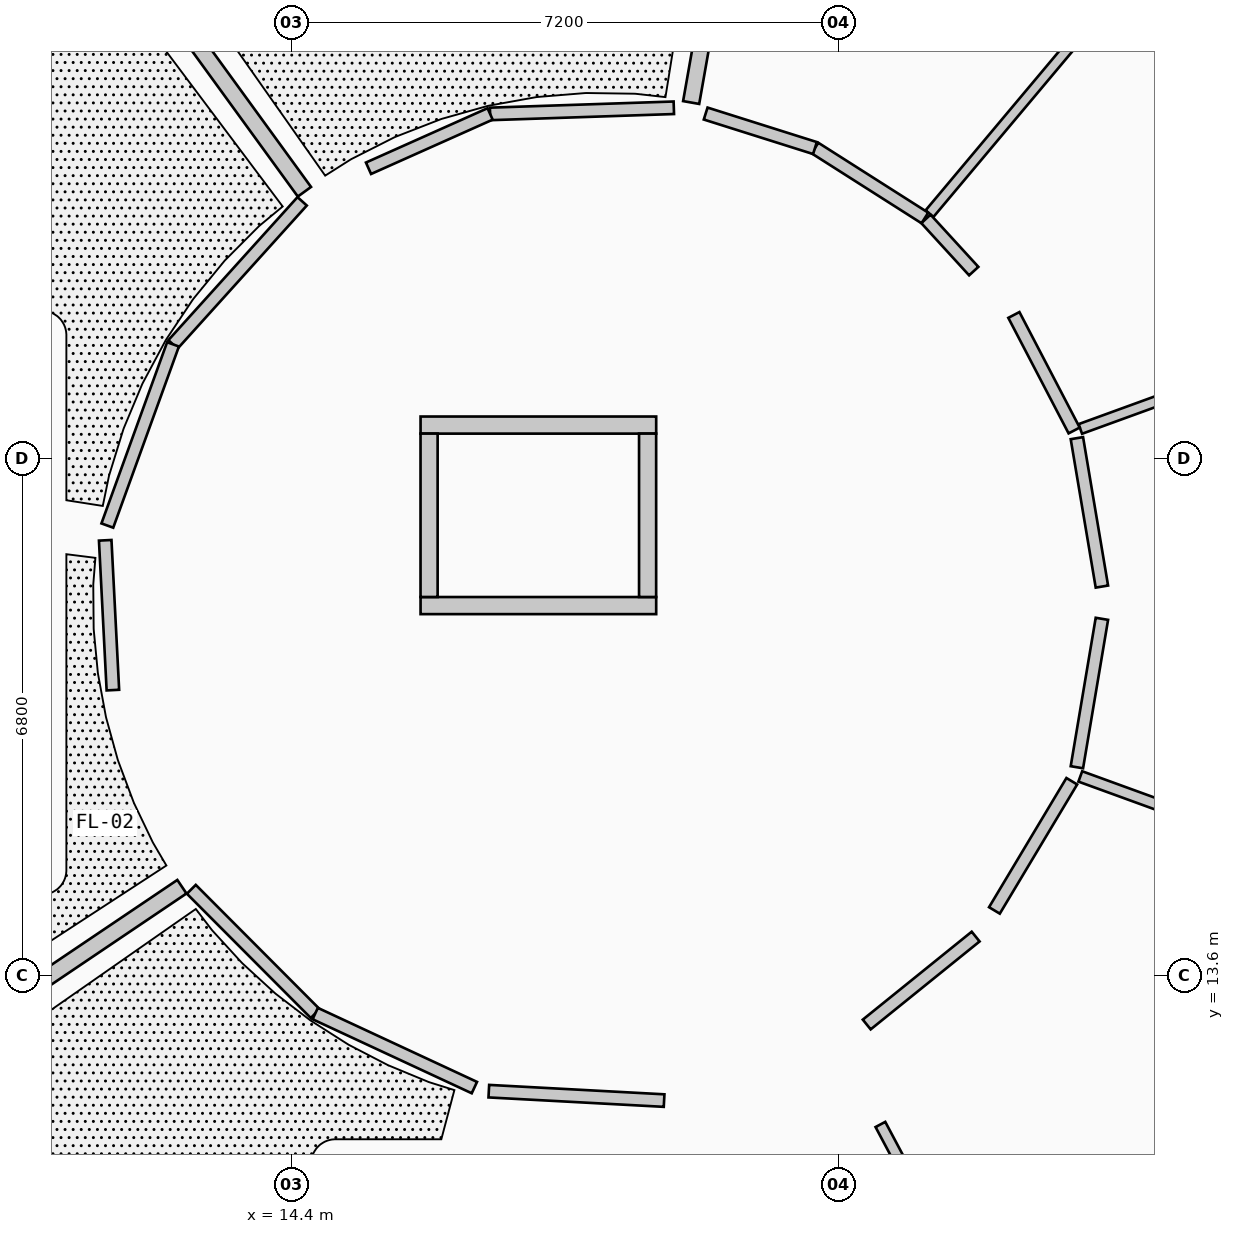
"""IFC4 building model, lengths in metres.
Left out: names, types, materials, properties, quantities, classifications, styles, units other than length and angle.
Written with IfcOpenShell. Run it as: python <this file> out.ifc"""

import sys

from ifc_helpers import new_model, si_unit, direction, frame, frame_2d, origin, origin_2d, place, context, subcontext, project, spatial, rectangle, extrude, element, fill, save


model = new_model("IFC4")
c1 = context("Model", 3, precision=1e-05, world=origin(), true_north=direction((0.0, 1.0)))
c2 = subcontext(c1, "Body", "Model", "MODEL_VIEW")
j1 = project(units=[si_unit("LENGTHUNIT", "METRE"), si_unit("PLANEANGLEUNIT", "RADIAN")], contexts=[c1])
p1 = place(None, origin())
s1 = spatial("IfcSite", under=j1, at=p1, CompositionType="ELEMENT")
p2 = place(p1, origin())
s2 = spatial("IfcBuilding", under=s1, at=p2, CompositionType="ELEMENT")
p3 = place(p2, frame((0.0, 0.0, 4.55)))
s3 = spatial("IfcBuildingStorey", under=s2, at=p3, CompositionType="ELEMENT", Elevation=4.55)
for number, where, z_axis, x_axis in (
    (1, (25.1, 18.5, 0.0), (0.0, 0.0, 1.0), (1.0, 0.0, 0.0)),
    (2, (23.556, 22.742, 0.0), (0.0, 0.0, 1.0), (1.0, 0.0, 0.0)),
    (3, (19.646, 25.0, 0.0), (0.0, 0.0, 1.0), (1.0, 0.0, 0.0)),
    (4, (15.2, 24.216, 0.0), (0.0, 0.0, 1.0), (1.0, 0.0, 0.0)),
    (5, (23.556, 14.258, 0.0), (0.0, 0.0, 1.0), (1.0, 0.0, 0.0)),
):
    element("IfcColumn", number, at=place(p3, frame(where, z_axis=z_axis, x_axis=x_axis)), inside=s3, PredefinedType="COLUMN", context=c2, shape_type="SweptSolid", body=[
        extrude(rectangle(XDim=0.42, YDim=0.42, at=origin_2d()), origin(), (0.0, 0.0, 1.0), 4.2),
    ])
p4 = place(p3, frame((16.1, 18.462, 0.0), z_axis=(0.0, 0.0, 1.0), x_axis=(1.0, 0.0, 0.0)))
e6 = element("IfcWall", 6, at=p4, inside=s3, PredefinedType="SHEAR", context=c2, shape_type="SweptSolid", body=[
    extrude(rectangle(XDim=3.1, YDim=0.225, at=frame_2d((1.55, 0.0))), origin(), (0.0, 0.0, 1.0), 3.955),
])
p5 = place(p4, frame((0.9, 0.0, 0.0)))
e7 = element("IfcOpeningElement", 7, at=p5, cuts=e6, PredefinedType="OPENING", context=c2, shape_type="SweptSolid", body=[
    extrude(rectangle(XDim=1.3, YDim=2.2, at=frame_2d((0.65, 1.1))), frame((0.0, 0.123, 0.0), z_axis=(0.0, -1.0, 0.0), x_axis=(1.0, 0.0, 0.0)), (0.0, 0.0, 1.0), 0.245),
])
p6 = place(p3, frame((16.1, 20.837, 0.0), z_axis=(0.0, 0.0, 1.0), x_axis=(1.0, 0.0, 0.0)))
e8 = element("IfcWall", 8, at=p6, inside=s3, PredefinedType="SHEAR", context=c2, shape_type="SweptSolid", body=[
    extrude(rectangle(XDim=3.1, YDim=0.225, at=frame_2d((1.55, 0.0))), origin(), (0.0, 0.0, 1.0), 3.955),
])
for number, where, z_axis, x_axis in (
    (9, (16.212, 18.575, 0.0), (0.0, 0.0, 1.0), (0.0, 1.0, 0.0)),
    (10, (19.087, 18.575, 0.0), (0.0, 0.0, 1.0), (0.0, 1.0, 0.0)),
):
    element("IfcWall", number, at=place(p3, frame(where, z_axis=z_axis, x_axis=x_axis)), inside=s3, PredefinedType="SHEAR", context=c2, shape_type="SweptSolid", body=[
        extrude(rectangle(XDim=2.15, YDim=0.225, at=frame_2d((1.075, 0.0))), origin(), (0.0, 0.0, 1.0), 3.955),
    ])
p7 = place(p3, frame((19.66, 25.081, 0.0), z_axis=(0.0, 0.0, 1.0), x_axis=(0.173787813666, 0.984783121211, 0.0)))
e11 = element("IfcWall", 11, at=p7, inside=s3, PredefinedType="SOLIDWALL", context=c2, shape_type="SweptSolid", body=[
    extrude(rectangle(XDim=5.616, YDim=0.215, at=frame_2d((2.808, 0.0))), origin(), (0.0, 0.0, 1.0), 3.284),
])
p8 = place(p3, frame((14.572, 23.907, 0.0), z_axis=(0.0, 0.0, 1.0), x_axis=(-0.58782249157, 0.808989937146, 0.0)))
e12 = element("IfcWall", 12, at=p8, inside=s3, PredefinedType="SOLIDWALL", context=c2, shape_type="SweptSolid", body=[
    extrude(rectangle(XDim=5.571, YDim=0.215, at=frame_2d((2.786, 0.0))), origin(), (0.0, 0.0, 1.0), 3.284),
])
p9 = place(p3, frame((12.96, 14.763, 0.0), z_axis=(0.0, 0.0, 1.0), x_axis=(-0.829078742877, -0.559131861111, 0.0)))
e13 = element("IfcWall", 13, at=p9, inside=s3, PredefinedType="SOLIDWALL", context=c2, shape_type="SweptSolid", body=[
    extrude(rectangle(XDim=5.571, YDim=0.215, at=frame_2d((2.786, 0.0))), origin(), (0.0, 0.0, 1.0), 3.284),
])
p10 = place(p3, frame((22.15, 11.635, 0.0), z_axis=(0.0, 0.0, 1.0), x_axis=(0.469519274504, -0.882922222435, 0.0)))
e14 = element("IfcWall", 14, at=p10, inside=s3, PredefinedType="PARTITIONING", context=c2, shape_type="SweptSolid", body=[
    extrude(rectangle(XDim=4.494, YDim=0.145, at=frame_2d((2.247, 0.0))), origin(), (0.0, 0.0, 1.0), 3.284),
])
p11 = place(p3, frame((24.78, 16.214, 0.0), z_axis=(0.0, 0.0, 1.0), x_axis=(0.939718505705, -0.341949016719, 0.0)))
e15 = element("IfcWall", 15, at=p11, inside=s3, PredefinedType="PARTITIONING", context=c2, shape_type="SweptSolid", body=[
    extrude(rectangle(XDim=5.615, YDim=0.145, at=frame_2d((2.808, 0.0))), origin(), (0.0, 0.0, 1.0), 3.284),
])
p12 = place(p3, frame((24.78, 20.786, 0.0), z_axis=(0.0, 0.0, 1.0), x_axis=(0.939718505705, 0.341949016719, 0.0)))
e16 = element("IfcWall", 16, at=p12, inside=s3, PredefinedType="PLUMBINGWALL", context=c2, shape_type="SweptSolid", body=[
    extrude(rectangle(XDim=5.615, YDim=0.135, at=frame_2d((2.808, 0.0))), origin(), (0.0, 0.0, 1.0), 3.284),
])
p13 = place(p3, frame((22.796, 23.619, 0.0), z_axis=(0.0, 0.0, 1.0), x_axis=(0.642818869514, 0.766018211923, 0.0)))
e17 = element("IfcWall", 17, at=p13, inside=s3, PredefinedType="PLUMBINGWALL", context=c2, shape_type="SweptSolid", body=[
    extrude(rectangle(XDim=5.616, YDim=0.135, at=frame_2d((2.808, 0.0))), origin(), (0.0, 0.0, 1.0), 3.284),
])
p14 = place(p3, frame((19.432, 25.012, 0.0), z_axis=(0.0, 0.0, 1.0), x_axis=(-0.999438163876, -0.033516512162, 0.0)))
e18 = element("IfcWall", 18, at=p14, inside=s3, PredefinedType="PARTITIONING", context=c2, shape_type="SweptSolid", body=[
    extrude(rectangle(XDim=2.418, YDim=0.165, at=frame_2d((1.209, 0.0))), origin(), (0.0, 0.0, 1.0), 3.284),
])
p15 = place(p14, frame((0.484, 0.0, 0.0)))
e19 = element("IfcOpeningElement", 19, at=p15, cuts=e18, PredefinedType="OPENING", context=c2, shape_type="SweptSolid", body=[
    extrude(rectangle(XDim=1.45, YDim=2.28, at=frame_2d((0.725, 1.14))), frame((0.0, 0.093, 0.0), z_axis=(0.0, -1.0, 0.0), x_axis=(1.0, 0.0, 0.0)), (0.0, 0.0, 1.0), 0.185),
])
p16 = place(p3, frame((17.015, 24.931, 0.0), z_axis=(0.0, 0.0, 1.0), x_axis=(-0.9130053983, -0.407947475389, 0.0)))
e20 = element("IfcWall", 20, at=p16, inside=s3, PredefinedType="PARTITIONING", context=c2, shape_type="SweptSolid", body=[
    extrude(rectangle(XDim=1.752, YDim=0.165, at=frame_2d((0.876, 0.0))), origin(), (0.0, 0.0, 1.0), 3.284),
])
p17 = place(p3, frame((14.542, 23.781, 0.0), z_axis=(0.0, 0.0, 1.0), x_axis=(-0.670075829694, -0.74229265284, 0.0)))
e21 = element("IfcWall", 21, at=p17, inside=s3, PredefinedType="PARTITIONING", context=c2, shape_type="SweptSolid", body=[
    extrude(rectangle(XDim=2.535, YDim=0.165, at=frame_2d((1.268, 0.0))), origin(), (0.0, 0.0, 1.0), 3.284),
])
p18 = place(p17, frame((0.593, 0.0, 0.0)))
e22 = element("IfcOpeningElement", 22, at=p18, cuts=e21, PredefinedType="OPENING", context=c2, shape_type="SweptSolid", body=[
    extrude(rectangle(XDim=1.35, YDim=2.22, at=frame_2d((0.675, 1.11))), frame((0.0, 0.093, 0.0), z_axis=(0.0, -1.0, 0.0), x_axis=(1.0, 0.0, 0.0)), (0.0, 0.0, 1.0), 0.185),
])
p19 = place(p3, frame((12.843, 21.899, 0.0), z_axis=(0.0, 0.0, 1.0), x_axis=(-0.34073018183, -0.940161126185, 0.0)))
e23 = element("IfcWall", 23, at=p19, inside=s3, PredefinedType="PARTITIONING", context=c2, shape_type="SweptSolid", body=[
    extrude(rectangle(XDim=2.536, YDim=0.165, at=frame_2d((1.268, 0.0))), origin(), (0.0, 0.0, 1.0), 3.284),
])
p20 = place(p3, frame((11.951, 19.321, 0.0), z_axis=(0.0, 0.0, 1.0), x_axis=(0.051214751973, -0.998687663477, 0.0)))
e24 = element("IfcWall", 24, at=p20, inside=s3, PredefinedType="PARTITIONING", context=c2, shape_type="SweptSolid", body=[
    extrude(rectangle(XDim=1.974, YDim=0.165, at=frame_2d((0.987, 0.0))), origin(), (0.0, 0.0, 1.0), 3.284),
])
p21 = place(p3, frame((13.084, 14.729, 0.0), z_axis=(0.0, 0.0, 1.0), x_axis=(0.70604855671, -0.708163424336, 0.0)))
e25 = element("IfcWall", 25, at=p21, inside=s3, PredefinedType="PARTITIONING", context=c2, shape_type="SweptSolid", body=[
    extrude(rectangle(XDim=2.309, YDim=0.165, at=frame_2d((1.154, 0.0))), origin(), (0.0, 0.0, 1.0), 3.284),
])
p22 = place(p21, frame((0.48, 0.0, 0.0)))
e26 = element("IfcOpeningElement", 26, at=p22, cuts=e25, PredefinedType="OPENING", context=c2, shape_type="SweptSolid", body=[
    extrude(rectangle(XDim=1.35, YDim=2.22, at=frame_2d((0.675, 1.11))), frame((0.0, 0.093, 0.0), z_axis=(0.0, -1.0, 0.0), x_axis=(1.0, 0.0, 0.0)), (0.0, 0.0, 1.0), 0.185),
])
for number, where, z_axis, x_axis in (
    (27, (14.714, 13.094, 0.0), (0.0, 0.0, 1.0), (0.907, -0.422, 0.0)),
    (28, (16.998, 12.073, 0.0), (0.0, 0.0, 1.0), (0.999, -0.054, 0.0)),
):
    element("IfcWall", number, at=place(p3, frame(where, z_axis=z_axis, x_axis=x_axis)), inside=s3, PredefinedType="PARTITIONING", context=c2, shape_type="SweptSolid", body=[
        extrude(rectangle(XDim=2.309, YDim=0.165, at=frame_2d((1.155, 0.0))), origin(), (0.0, 0.0, 1.0), 3.284),
    ])
p23 = place(p3, frame((21.97, 12.95, 0.0), z_axis=(0.0, 0.0, 1.0), x_axis=(0.778080714505, 0.62816431108, 0.0)))
e29 = element("IfcWall", 29, at=p23, inside=s3, PredefinedType="PARTITIONING", context=c2, shape_type="SweptSolid", body=[
    extrude(rectangle(XDim=1.842, YDim=0.165, at=frame_2d((0.921, 0.0))), origin(), (0.0, 0.0, 1.0), 3.284),
])
p24 = place(p23, frame((0.466, 0.0, 0.0)))
e30 = element("IfcOpeningElement", 30, at=p24, cuts=e29, PredefinedType="OPENING", context=c2, shape_type="SweptSolid", body=[
    extrude(rectangle(XDim=0.91, YDim=2.15, at=frame_2d((0.455, 1.075))), frame((0.0, 0.093, 0.0), z_axis=(0.0, -1.0, 0.0), x_axis=(1.0, 0.0, 0.0)), (0.0, 0.0, 1.0), 0.185),
])
p25 = place(p3, frame((23.65, 14.451, 0.0), z_axis=(0.0, 0.0, 1.0), x_axis=(0.513788930693, 0.85791662456, 0.0)))
e31 = element("IfcWall", 31, at=p25, inside=s3, PredefinedType="PARTITIONING", context=c2, shape_type="SweptSolid", body=[
    extrude(rectangle(XDim=1.981, YDim=0.165, at=frame_2d((0.991, 0.0))), origin(), (0.0, 0.0, 1.0), 3.284),
])
p26 = place(p3, frame((24.735, 16.335, 0.0), z_axis=(0.0, 0.0, 1.0), x_axis=(0.166037850653, 0.986119380273, 0.0)))
e32 = element("IfcWall", 32, at=p26, inside=s3, PredefinedType="PARTITIONING", context=c2, shape_type="SweptSolid", body=[
    extrude(rectangle(XDim=1.981, YDim=0.165, at=frame_2d((0.99, 0.0))), origin(), (0.0, 0.0, 1.0), 3.284),
])
p27 = place(p26, frame((0.525, 0.0, 0.0)))
e33 = element("IfcOpeningElement", 33, at=p27, cuts=e32, PredefinedType="OPENING", context=c2, shape_type="SweptSolid", body=[
    extrude(rectangle(XDim=0.93, YDim=2.18, at=frame_2d((0.465, 1.09))), frame((0.0, 0.093, 0.0), z_axis=(0.0, -1.0, 0.0), x_axis=(1.0, 0.0, 0.0)), (0.0, 0.0, 1.0), 0.185),
])
p28 = place(p3, frame((25.064, 18.712, 0.0), z_axis=(0.0, 0.0, 1.0), x_axis=(-0.166037850653, 0.986119380273, 0.0)))
e34 = element("IfcWall", 34, at=p28, inside=s3, PredefinedType="PARTITIONING", context=c2, shape_type="SweptSolid", body=[
    extrude(rectangle(XDim=1.981, YDim=0.165, at=frame_2d((0.99, 0.0))), origin(), (0.0, 0.0, 1.0), 3.284),
])
p29 = place(p3, frame((24.699, 20.766, 0.0), z_axis=(0.0, 0.0, 1.0), x_axis=(-0.462585475812, 0.886574688093, 0.0)))
e35 = element("IfcWall", 35, at=p29, inside=s3, PredefinedType="PARTITIONING", context=c2, shape_type="SweptSolid", body=[
    extrude(rectangle(XDim=1.714, YDim=0.165, at=frame_2d((0.857, 0.0))), origin(), (0.0, 0.0, 1.0), 3.284),
])
p30 = place(p29, frame((0.387, 0.0, 0.0)))
e36 = element("IfcOpeningElement", 36, at=p30, cuts=e35, PredefinedType="OPENING", context=c2, shape_type="SweptSolid", body=[
    extrude(rectangle(XDim=0.94, YDim=2.1, at=frame_2d((0.47, 1.05))), frame((0.0, 0.093, 0.0), z_axis=(0.0, -1.0, 0.0), x_axis=(1.0, 0.0, 0.0)), (0.0, 0.0, 1.0), 0.185),
])
p31 = place(p3, frame((23.378, 22.863, 0.0), z_axis=(0.0, 0.0, 1.0), x_axis=(-0.675225947862, 0.737610953914, 0.0)))
e37 = element("IfcWall", 37, at=p31, inside=s3, PredefinedType="PARTITIONING", context=c2, shape_type="SweptSolid", body=[
    extrude(rectangle(XDim=0.931, YDim=0.165, at=frame_2d((0.466, 0.0))), origin(), (0.0, 0.0, 1.0), 3.284),
])
p32 = place(p3, frame((22.735, 23.562, 0.0), z_axis=(0.0, 0.0, 1.0), x_axis=(-0.843737732446, 0.536755660283, 0.0)))
e38 = element("IfcWall", 38, at=p32, inside=s3, PredefinedType="PARTITIONING", context=c2, shape_type="SweptSolid", body=[
    extrude(rectangle(XDim=1.714, YDim=0.165, at=frame_2d((0.857, 0.0))), origin(), (0.0, 0.0, 1.0), 3.284),
])
p33 = place(p32, frame((0.367, 0.0, 0.0)))
e39 = element("IfcOpeningElement", 39, at=p33, cuts=e38, PredefinedType="OPENING", context=c2, shape_type="SweptSolid", body=[
    extrude(rectangle(XDim=0.98, YDim=2.1, at=frame_2d((0.49, 1.05))), frame((0.0, 0.093, 0.0), z_axis=(0.0, -1.0, 0.0), x_axis=(1.0, 0.0, 0.0)), (0.0, 0.0, 1.0), 0.185),
])
p34 = place(p3, frame((21.289, 24.482, 0.0), z_axis=(0.0, 0.0, 1.0), x_axis=(-0.953582665134, 0.301131367937, 0.0)))
e40 = element("IfcWall", 40, at=p34, inside=s3, PredefinedType="PARTITIONING", context=c2, shape_type="SweptSolid", body=[
    extrude(rectangle(XDim=1.508, YDim=0.165, at=frame_2d((0.754, 0.0))), origin(), (0.0, 0.0, 1.0), 3.284),
])
p35 = place(p5, origin())
e41 = element("IfcDoor", 41, at=p35, inside=s3, OperationType="DOUBLE_DOOR_SLIDING", PredefinedType="DOOR", context=c2, shape_type="SweptSolid", body=[
    extrude(rectangle(XDim=1.3, YDim=2.2, at=frame_2d((0.65, 1.1))), frame((0.0, 0.025, 0.0), z_axis=(0.0, -1.0, 0.0), x_axis=(1.0, 0.0, 0.0)), (0.0, 0.0, 1.0), 0.05),
])
fill(e7, e41)
p36 = place(p15, origin())
e42 = element("IfcDoor", 42, at=p36, inside=s3, OperationType="SINGLE_SWING_LEFT", PredefinedType="DOOR", context=c2, shape_type="SweptSolid", body=[
    extrude(rectangle(XDim=1.45, YDim=2.28, at=frame_2d((0.725, 1.14))), frame((0.0, 0.025, 0.0), z_axis=(0.0, -1.0, 0.0), x_axis=(1.0, 0.0, 0.0)), (0.0, 0.0, 1.0), 0.05),
])
fill(e19, e42)
p37 = place(p18, origin())
e43 = element("IfcDoor", 43, at=p37, inside=s3, OperationType="SINGLE_SWING_RIGHT", PredefinedType="DOOR", context=c2, shape_type="SweptSolid", body=[
    extrude(rectangle(XDim=1.35, YDim=2.22, at=frame_2d((0.675, 1.11))), frame((0.0, 0.025, 0.0), z_axis=(0.0, -1.0, 0.0), x_axis=(1.0, 0.0, 0.0)), (0.0, 0.0, 1.0), 0.05),
])
fill(e22, e43)
p38 = place(p22, origin())
e44 = element("IfcDoor", 44, at=p38, inside=s3, OperationType="SINGLE_SWING_LEFT", PredefinedType="DOOR", context=c2, shape_type="SweptSolid", body=[
    extrude(rectangle(XDim=1.35, YDim=2.22, at=frame_2d((0.675, 1.11))), frame((0.0, 0.025, 0.0), z_axis=(0.0, -1.0, 0.0), x_axis=(1.0, 0.0, 0.0)), (0.0, 0.0, 1.0), 0.05),
])
fill(e26, e44)
p39 = place(p24, origin())
e45 = element("IfcDoor", 45, at=p39, inside=s3, OperationType="SINGLE_SWING_RIGHT", PredefinedType="DOOR", context=c2, shape_type="SweptSolid", body=[
    extrude(rectangle(XDim=0.91, YDim=2.15, at=frame_2d((0.455, 1.075))), frame((0.0, 0.025, 0.0), z_axis=(0.0, -1.0, 0.0), x_axis=(1.0, 0.0, 0.0)), (0.0, 0.0, 1.0), 0.05),
])
fill(e30, e45)
p40 = place(p27, origin())
e46 = element("IfcDoor", 46, at=p40, inside=s3, OperationType="SINGLE_SWING_LEFT", PredefinedType="DOOR", context=c2, shape_type="SweptSolid", body=[
    extrude(rectangle(XDim=0.93, YDim=2.18, at=frame_2d((0.465, 1.09))), frame((0.0, 0.025, 0.0), z_axis=(0.0, -1.0, 0.0), x_axis=(1.0, 0.0, 0.0)), (0.0, 0.0, 1.0), 0.05),
])
fill(e33, e46)
p41 = place(p30, origin())
e47 = element("IfcDoor", 47, at=p41, inside=s3, OperationType="SINGLE_SWING_RIGHT", PredefinedType="DOOR", context=c2, shape_type="SweptSolid", body=[
    extrude(rectangle(XDim=0.94, YDim=2.1, at=frame_2d((0.47, 1.05))), frame((0.0, 0.025, 0.0), z_axis=(0.0, -1.0, 0.0), x_axis=(1.0, 0.0, 0.0)), (0.0, 0.0, 1.0), 0.05),
])
fill(e36, e47)
p42 = place(p33, origin())
e48 = element("IfcDoor", 48, at=p42, inside=s3, OperationType="SINGLE_SWING_LEFT", PredefinedType="DOOR", context=c2, shape_type="SweptSolid", body=[
    extrude(rectangle(XDim=0.98, YDim=2.1, at=frame_2d((0.49, 1.05))), frame((0.0, 0.025, 0.0), z_axis=(0.0, -1.0, 0.0), x_axis=(1.0, 0.0, 0.0)), (0.0, 0.0, 1.0), 0.05),
])
fill(e39, e48)
save(model, sys.argv[1])
